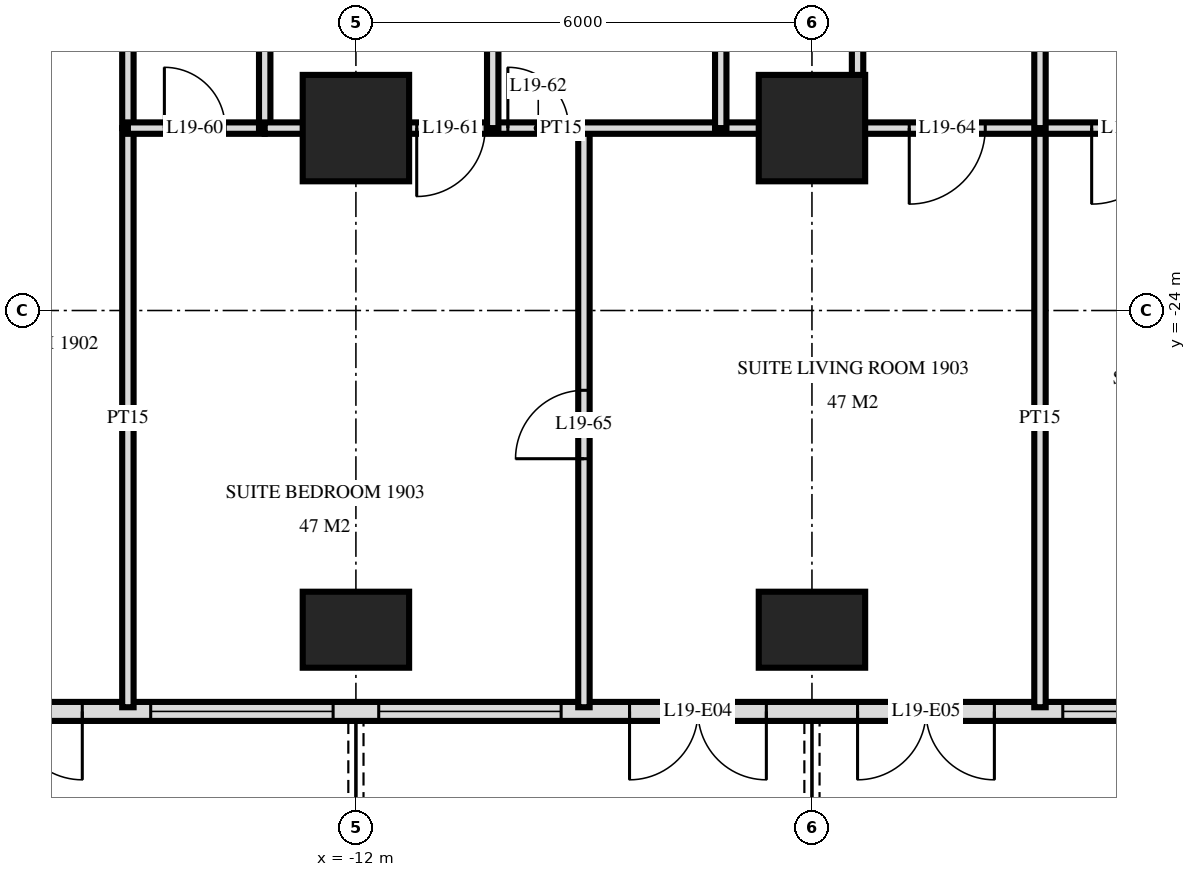
"""IFC4 building model, lengths in metres.
Left out: names, types, materials, properties, quantities, classifications, styles, units other than length and angle.
Written with IfcOpenShell. Run it as: python <this file> out.ifc"""

import sys

from ifc_helpers import new_model, si_unit, direction, frame, frame_2d, origin, origin_2d, place, context, subcontext, project, spatial, rectangle, extrude, element, fill, save


model = new_model("IFC4")
c1 = context("Model", 3, precision=1e-05, world=origin(), true_north=direction((0.0, 1.0)))
c2 = subcontext(c1, "Body", "Model", "MODEL_VIEW")
j1 = project(units=[si_unit("LENGTHUNIT", "METRE"), si_unit("PLANEANGLEUNIT", "RADIAN")], contexts=[c1])
p1 = place(None, origin())
s1 = spatial("IfcSite", under=j1, at=p1, CompositionType="ELEMENT")
p2 = place(p1, origin())
s2 = spatial("IfcBuilding", under=s1, at=p2, CompositionType="ELEMENT")
p3 = place(p2, frame((0.0, 0.0, 78.0)))
s3 = spatial("IfcBuildingStorey", under=s2, at=p3, CompositionType="ELEMENT", Elevation=78.0)
p4 = place(p3, frame((-12.0, -28.2, 0.0), z_axis=(0.0, 0.0, 1.0), x_axis=(1.0, 0.0, 0.0)))
e1 = element("IfcColumn", 1, at=p4, inside=s3, PredefinedType="COLUMN", context=c2, shape_type="SweptSolid", body=[
    extrude(rectangle(XDim=1.4, YDim=1.0, at=origin_2d()), origin(), (0.0, 0.0, 1.0), 3.6),
])
p5 = place(p3, frame((-12.0, -21.6, 0.0), z_axis=(0.0, 0.0, 1.0), x_axis=(1.0, 0.0, 0.0)))
e2 = element("IfcColumn", 2, at=p5, inside=s3, PredefinedType="COLUMN", context=c2, shape_type="SweptSolid", body=[
    extrude(rectangle(XDim=1.4, YDim=1.4, at=origin_2d()), origin(), (0.0, 0.0, 1.0), 3.6),
])
p6 = place(p3, frame((-6.0, -28.2, 0.0), z_axis=(0.0, 0.0, 1.0), x_axis=(1.0, 0.0, 0.0)))
e3 = element("IfcColumn", 3, at=p6, inside=s3, PredefinedType="COLUMN", context=c2, shape_type="SweptSolid", body=[
    extrude(rectangle(XDim=1.4, YDim=1.0, at=origin_2d()), origin(), (0.0, 0.0, 1.0), 3.6),
])
p7 = place(p3, frame((-6.0, -21.6, 0.0), z_axis=(0.0, 0.0, 1.0), x_axis=(1.0, 0.0, 0.0)))
e4 = element("IfcColumn", 4, at=p7, inside=s3, PredefinedType="COLUMN", context=c2, shape_type="SweptSolid", body=[
    extrude(rectangle(XDim=1.4, YDim=1.4, at=origin_2d()), origin(), (0.0, 0.0, 1.0), 3.6),
])
p8 = place(p3, frame((-28.775, -29.275, 0.0), z_axis=(0.0, 0.0, 1.0), x_axis=(1.0, 0.0, 0.0)))
e5 = element("IfcWall", 5, at=p8, inside=s3, PredefinedType="SOLIDWALL", context=c2, shape_type="SweptSolid", body=[
    extrude(rectangle(XDim=57.551, YDim=0.25, at=frame_2d((28.775, 0.0))), origin(), (0.0, 0.0, 1.0), 3.32),
])
p9 = place(p8, frame((0.575, 0.0, 0.0)))
e6 = element("IfcOpeningElement", 6, at=p9, cuts=e5, PredefinedType="OPENING", context=c2, shape_type="SweptSolid", body=[
    extrude(rectangle(XDim=1.8, YDim=2.4, at=frame_2d((0.9, 1.2))), frame((0.0, 0.135, 0.0), z_axis=(0.0, -1.0, 0.0), x_axis=(1.0, 0.0, 0.0)), (0.0, 0.0, 1.0), 0.27),
])
p10 = place(p8, frame((5.375, 0.0, 0.0)))
e7 = element("IfcOpeningElement", 7, at=p10, cuts=e5, PredefinedType="OPENING", context=c2, shape_type="SweptSolid", body=[
    extrude(rectangle(XDim=1.8, YDim=2.4, at=frame_2d((0.9, 1.2))), frame((0.0, 0.135, 0.0), z_axis=(0.0, -1.0, 0.0), x_axis=(1.0, 0.0, 0.0)), (0.0, 0.0, 1.0), 0.27),
])
p11 = place(p8, frame((8.075, 0.0, 0.3)))
e8 = element("IfcOpeningElement", 8, at=p11, cuts=e5, PredefinedType="OPENING", context=c2, shape_type="SweptSolid", body=[
    extrude(rectangle(XDim=2.4, YDim=2.1, at=frame_2d((1.2, 1.05))), frame((0.0, 0.135, 0.0), z_axis=(0.0, -1.0, 0.0), x_axis=(1.0, 0.0, 0.0)), (0.0, 0.0, 1.0), 0.27),
])
p12 = place(p8, frame((11.375, 0.0, 0.0)))
e9 = element("IfcOpeningElement", 9, at=p12, cuts=e5, PredefinedType="OPENING", context=c2, shape_type="SweptSolid", body=[
    extrude(rectangle(XDim=1.8, YDim=2.4, at=frame_2d((0.9, 1.2))), frame((0.0, 0.135, 0.0), z_axis=(0.0, -1.0, 0.0), x_axis=(1.0, 0.0, 0.0)), (0.0, 0.0, 1.0), 0.27),
])
p13 = place(p8, frame((14.075, 0.0, 0.3)))
e10 = element("IfcOpeningElement", 10, at=p13, cuts=e5, PredefinedType="OPENING", context=c2, shape_type="SweptSolid", body=[
    extrude(rectangle(XDim=2.4, YDim=2.1, at=frame_2d((1.2, 1.05))), frame((0.0, 0.135, 0.0), z_axis=(0.0, -1.0, 0.0), x_axis=(1.0, 0.0, 0.0)), (0.0, 0.0, 1.0), 0.27),
])
p14 = place(p8, frame((17.075, 0.0, 0.3)))
e11 = element("IfcOpeningElement", 11, at=p14, cuts=e5, PredefinedType="OPENING", context=c2, shape_type="SweptSolid", body=[
    extrude(rectangle(XDim=2.4, YDim=2.1, at=frame_2d((1.2, 1.05))), frame((0.0, 0.135, 0.0), z_axis=(0.0, -1.0, 0.0), x_axis=(1.0, 0.0, 0.0)), (0.0, 0.0, 1.0), 0.27),
])
p15 = place(p8, frame((20.375, 0.0, 0.0)))
e12 = element("IfcOpeningElement", 12, at=p15, cuts=e5, PredefinedType="OPENING", context=c2, shape_type="SweptSolid", body=[
    extrude(rectangle(XDim=1.8, YDim=2.4, at=frame_2d((0.9, 1.2))), frame((0.0, 0.135, 0.0), z_axis=(0.0, -1.0, 0.0), x_axis=(1.0, 0.0, 0.0)), (0.0, 0.0, 1.0), 0.27),
])
p16 = place(p8, frame((23.375, 0.0, 0.0)))
e13 = element("IfcOpeningElement", 13, at=p16, cuts=e5, PredefinedType="OPENING", context=c2, shape_type="SweptSolid", body=[
    extrude(rectangle(XDim=1.8, YDim=2.4, at=frame_2d((0.9, 1.2))), frame((0.0, 0.135, 0.0), z_axis=(0.0, -1.0, 0.0), x_axis=(1.0, 0.0, 0.0)), (0.0, 0.0, 1.0), 0.27),
])
p17 = place(p8, frame((26.075, 0.0, 0.3)))
e14 = element("IfcOpeningElement", 14, at=p17, cuts=e5, PredefinedType="OPENING", context=c2, shape_type="SweptSolid", body=[
    extrude(rectangle(XDim=2.4, YDim=2.1, at=frame_2d((1.2, 1.05))), frame((0.0, 0.135, 0.0), z_axis=(0.0, -1.0, 0.0), x_axis=(1.0, 0.0, 0.0)), (0.0, 0.0, 1.0), 0.27),
])
p18 = place(p8, frame((29.375, 0.0, 0.0)))
e15 = element("IfcOpeningElement", 15, at=p18, cuts=e5, PredefinedType="OPENING", context=c2, shape_type="SweptSolid", body=[
    extrude(rectangle(XDim=1.8, YDim=2.4, at=frame_2d((0.9, 1.2))), frame((0.0, 0.135, 0.0), z_axis=(0.0, -1.0, 0.0), x_axis=(1.0, 0.0, 0.0)), (0.0, 0.0, 1.0), 0.27),
])
p19 = place(p8, frame((32.075, 0.0, 0.3)))
e16 = element("IfcOpeningElement", 16, at=p19, cuts=e5, PredefinedType="OPENING", context=c2, shape_type="SweptSolid", body=[
    extrude(rectangle(XDim=2.4, YDim=2.1, at=frame_2d((1.2, 1.05))), frame((0.0, 0.135, 0.0), z_axis=(0.0, -1.0, 0.0), x_axis=(1.0, 0.0, 0.0)), (0.0, 0.0, 1.0), 0.27),
])
p20 = place(p8, frame((35.375, 0.0, 0.0)))
e17 = element("IfcOpeningElement", 17, at=p20, cuts=e5, PredefinedType="OPENING", context=c2, shape_type="SweptSolid", body=[
    extrude(rectangle(XDim=1.8, YDim=2.4, at=frame_2d((0.9, 1.2))), frame((0.0, 0.135, 0.0), z_axis=(0.0, -1.0, 0.0), x_axis=(1.0, 0.0, 0.0)), (0.0, 0.0, 1.0), 0.27),
])
p21 = place(p8, frame((38.075, 0.0, 0.3)))
e18 = element("IfcOpeningElement", 18, at=p21, cuts=e5, PredefinedType="OPENING", context=c2, shape_type="SweptSolid", body=[
    extrude(rectangle(XDim=2.4, YDim=2.1, at=frame_2d((1.2, 1.05))), frame((0.0, 0.135, 0.0), z_axis=(0.0, -1.0, 0.0), x_axis=(1.0, 0.0, 0.0)), (0.0, 0.0, 1.0), 0.27),
])
p22 = place(p8, frame((41.375, 0.0, 0.0)))
e19 = element("IfcOpeningElement", 19, at=p22, cuts=e5, PredefinedType="OPENING", context=c2, shape_type="SweptSolid", body=[
    extrude(rectangle(XDim=1.8, YDim=2.4, at=frame_2d((0.9, 1.2))), frame((0.0, 0.135, 0.0), z_axis=(0.0, -1.0, 0.0), x_axis=(1.0, 0.0, 0.0)), (0.0, 0.0, 1.0), 0.27),
])
p23 = place(p8, frame((44.075, 0.0, 0.3)))
e20 = element("IfcOpeningElement", 20, at=p23, cuts=e5, PredefinedType="OPENING", context=c2, shape_type="SweptSolid", body=[
    extrude(rectangle(XDim=2.4, YDim=2.1, at=frame_2d((1.2, 1.05))), frame((0.0, 0.135, 0.0), z_axis=(0.0, -1.0, 0.0), x_axis=(1.0, 0.0, 0.0)), (0.0, 0.0, 1.0), 0.27),
])
p24 = place(p8, frame((47.075, 0.0, 0.3)))
e21 = element("IfcOpeningElement", 21, at=p24, cuts=e5, PredefinedType="OPENING", context=c2, shape_type="SweptSolid", body=[
    extrude(rectangle(XDim=2.4, YDim=2.1, at=frame_2d((1.2, 1.05))), frame((0.0, 0.135, 0.0), z_axis=(0.0, -1.0, 0.0), x_axis=(1.0, 0.0, 0.0)), (0.0, 0.0, 1.0), 0.27),
])
p25 = place(p8, frame((50.375, 0.0, 0.0)))
e22 = element("IfcOpeningElement", 22, at=p25, cuts=e5, PredefinedType="OPENING", context=c2, shape_type="SweptSolid", body=[
    extrude(rectangle(XDim=1.8, YDim=2.4, at=frame_2d((0.9, 1.2))), frame((0.0, 0.135, 0.0), z_axis=(0.0, -1.0, 0.0), x_axis=(1.0, 0.0, 0.0)), (0.0, 0.0, 1.0), 0.27),
])
p26 = place(p8, frame((53.375, 0.0, 0.0)))
e23 = element("IfcOpeningElement", 23, at=p26, cuts=e5, PredefinedType="OPENING", context=c2, shape_type="SweptSolid", body=[
    extrude(rectangle(XDim=1.8, YDim=2.4, at=frame_2d((0.9, 1.2))), frame((0.0, 0.135, 0.0), z_axis=(0.0, -1.0, 0.0), x_axis=(1.0, 0.0, 0.0)), (0.0, 0.0, 1.0), 0.27),
])
p27 = place(p3, frame((-3.0, -21.6, 0.0), z_axis=(0.0, 0.0, 1.0), x_axis=(0.0, 1.0, 0.0)))
e24 = element("IfcWall", 24, at=p27, inside=s3, PredefinedType="PARTITIONING", context=c2, shape_type="SweptSolid", body=[
    extrude(rectangle(XDim=4.2, YDim=0.15, at=frame_2d((2.1, 0.0))), origin(), (0.0, 0.0, 1.0), 3.32),
])
p28 = place(p3, frame((-3.0, -29.22, 0.0), z_axis=(0.0, 0.0, 1.0), x_axis=(0.0, 1.0, 0.0)))
e25 = element("IfcWall", 25, at=p28, inside=s3, PredefinedType="PARTITIONING", context=c2, shape_type="SweptSolid", body=[
    extrude(rectangle(XDim=7.62, YDim=0.15, at=frame_2d((3.81, 0.0))), origin(), (0.0, 0.0, 1.0), 3.32),
])
p29 = place(p3, frame((-5.4, -21.6, 0.0), z_axis=(0.0, 0.0, 1.0), x_axis=(0.0, 1.0, 0.0)))
e26 = element("IfcWall", 26, at=p29, inside=s3, PredefinedType="PARTITIONING", context=c2, shape_type="SweptSolid", body=[
    extrude(rectangle(XDim=4.2, YDim=0.15, at=frame_2d((2.1, 0.0))), origin(), (0.0, 0.0, 1.0), 3.32),
])
p30 = place(p29, frame((1.58, 0.0, 0.0)))
e27 = element("IfcOpeningElement", 27, at=p30, cuts=e26, PredefinedType="OPENING", context=c2, shape_type="SweptSolid", body=[
    extrude(rectangle(XDim=1.0, YDim=2.1, at=frame_2d((0.5, 1.05))), frame((0.0, 0.085, 0.0), z_axis=(0.0, -1.0, 0.0), x_axis=(1.0, 0.0, 0.0)), (0.0, 0.0, 1.0), 0.17),
])
p31 = place(p3, frame((-7.2, -21.6, 0.0), z_axis=(0.0, 0.0, 1.0), x_axis=(0.0, 1.0, 0.0)))
e28 = element("IfcWall", 28, at=p31, inside=s3, PredefinedType="PARTITIONING", context=c2, shape_type="SweptSolid", body=[
    extrude(rectangle(XDim=4.2, YDim=0.15, at=frame_2d((2.1, 0.0))), origin(), (0.0, 0.0, 1.0), 3.32),
])
p32 = place(p3, frame((-9.0, -29.22, 0.0), z_axis=(0.0, 0.0, 1.0), x_axis=(0.0, 1.0, 0.0)))
e29 = element("IfcWall", 29, at=p32, inside=s3, PredefinedType="PARTITIONING", context=c2, shape_type="SweptSolid", body=[
    extrude(rectangle(XDim=7.62, YDim=0.15, at=frame_2d((3.81, 0.0))), origin(), (0.0, 0.0, 1.0), 3.32),
])
p33 = place(p32, frame((3.27, 0.0, 0.0)))
e30 = element("IfcOpeningElement", 30, at=p33, cuts=e29, PredefinedType="OPENING", context=c2, shape_type="SweptSolid", body=[
    extrude(rectangle(XDim=0.9, YDim=2.1, at=frame_2d((0.45, 1.05))), frame((0.0, 0.085, 0.0), z_axis=(0.0, -1.0, 0.0), x_axis=(1.0, 0.0, 0.0)), (0.0, 0.0, 1.0), 0.17),
])
p34 = place(p3, frame((-10.2, -21.6, 0.0), z_axis=(0.0, 0.0, 1.0), x_axis=(0.0, 1.0, 0.0)))
e31 = element("IfcWall", 31, at=p34, inside=s3, PredefinedType="PARTITIONING", context=c2, shape_type="SweptSolid", body=[
    extrude(rectangle(XDim=4.2, YDim=0.15, at=frame_2d((2.1, 0.0))), origin(), (0.0, 0.0, 1.0), 3.32),
])
p35 = place(p3, frame((-13.2, -21.6, 0.0), z_axis=(0.0, 0.0, 1.0), x_axis=(0.0, 1.0, 0.0)))
e32 = element("IfcWall", 32, at=p35, inside=s3, PredefinedType="PLUMBINGWALL", context=c2, shape_type="SweptSolid", body=[
    extrude(rectangle(XDim=4.2, YDim=0.15, at=frame_2d((2.1, 0.0))), origin(), (0.0, 0.0, 1.0), 3.32),
])
p36 = place(p3, frame((-15.0, -29.22, 0.0), z_axis=(0.0, 0.0, 1.0), x_axis=(0.0, 1.0, 0.0)))
e33 = element("IfcWall", 33, at=p36, inside=s3, PredefinedType="PARTITIONING", context=c2, shape_type="SweptSolid", body=[
    extrude(rectangle(XDim=7.62, YDim=0.15, at=frame_2d((3.81, 0.0))), origin(), (0.0, 0.0, 1.0), 3.32),
])
p37 = place(p3, frame((-15.0, -21.6, 0.0), z_axis=(0.0, 0.0, 1.0), x_axis=(0.0, 1.0, 0.0)))
e34 = element("IfcWall", 34, at=p37, inside=s3, PredefinedType="PLUMBINGWALL", context=c2, shape_type="SweptSolid", body=[
    extrude(rectangle(XDim=4.2, YDim=0.15, at=frame_2d((2.1, 0.0))), origin(), (0.0, 0.0, 1.0), 3.32),
])
p38 = place(p3, frame((-5.4, -21.6, 0.0), z_axis=(0.0, 0.0, 1.0), x_axis=(1.0, 0.0, 0.0)))
e35 = element("IfcWall", 35, at=p38, inside=s3, PredefinedType="PARTITIONING", context=c2, shape_type="SweptSolid", body=[
    extrude(rectangle(XDim=4.8, YDim=0.15, at=frame_2d((2.4, 0.0))), origin(), (0.0, 0.0, 1.0), 3.32),
])
p39 = place(p38, frame((0.68, 0.0, 0.0)))
e36 = element("IfcOpeningElement", 36, at=p39, cuts=e35, PredefinedType="OPENING", context=c2, shape_type="SweptSolid", body=[
    extrude(rectangle(XDim=1.0, YDim=2.1, at=frame_2d((0.5, 1.05))), frame((0.0, 0.085, 0.0), z_axis=(0.0, -1.0, 0.0), x_axis=(1.0, 0.0, 0.0)), (0.0, 0.0, 1.0), 0.17),
])
p40 = place(p38, frame((3.08, 0.0, 0.0)))
e37 = element("IfcOpeningElement", 37, at=p40, cuts=e35, PredefinedType="OPENING", context=c2, shape_type="SweptSolid", body=[
    extrude(rectangle(XDim=1.0, YDim=2.1, at=frame_2d((0.5, 1.05))), frame((0.0, 0.085, 0.0), z_axis=(0.0, -1.0, 0.0), x_axis=(1.0, 0.0, 0.0)), (0.0, 0.0, 1.0), 0.17),
])
p41 = place(p3, frame((-13.2, -21.6, 0.0), z_axis=(0.0, 0.0, 1.0), x_axis=(1.0, 0.0, 0.0)))
e38 = element("IfcWall", 38, at=p41, inside=s3, PredefinedType="PARTITIONING", context=c2, shape_type="SweptSolid", body=[
    extrude(rectangle(XDim=7.8, YDim=0.15, at=frame_2d((3.9, 0.0))), origin(), (0.0, 0.0, 1.0), 3.32),
])
p42 = place(p41, frame((2.0, 0.0, 0.0)))
e39 = element("IfcOpeningElement", 39, at=p42, cuts=e38, PredefinedType="OPENING", context=c2, shape_type="SweptSolid", body=[
    extrude(rectangle(XDim=0.9, YDim=2.1, at=frame_2d((0.45, 1.05))), frame((0.0, 0.085, 0.0), z_axis=(0.0, -1.0, 0.0), x_axis=(1.0, 0.0, 0.0)), (0.0, 0.0, 1.0), 0.17),
])
p43 = place(p41, frame((3.199, 0.0, 0.0)))
e40 = element("IfcOpeningElement", 40, at=p43, cuts=e38, PredefinedType="OPENING", context=c2, shape_type="SweptSolid", body=[
    extrude(rectangle(XDim=0.8, YDim=2.1, at=frame_2d((0.4, 1.05))), frame((0.0, 0.085, 0.0), z_axis=(0.0, -1.0, 0.0), x_axis=(1.0, 0.0, 0.0)), (0.0, 0.0, 1.0), 0.17),
])
p44 = place(p3, frame((-15.0, -21.6, 0.0), z_axis=(0.0, 0.0, 1.0), x_axis=(1.0, 0.0, 0.0)))
e41 = element("IfcWall", 41, at=p44, inside=s3, PredefinedType="PLUMBINGWALL", context=c2, shape_type="SweptSolid", body=[
    extrude(rectangle(XDim=1.8, YDim=0.15, at=frame_2d((0.9, 0.0))), origin(), (0.0, 0.0, 1.0), 3.32),
])
p45 = place(p44, frame((0.48, 0.0, 0.0)))
e42 = element("IfcOpeningElement", 42, at=p45, cuts=e41, PredefinedType="OPENING", context=c2, shape_type="SweptSolid", body=[
    extrude(rectangle(XDim=0.8, YDim=2.1, at=frame_2d((0.4, 1.05))), frame((0.0, 0.085, 0.0), z_axis=(0.0, -1.0, 0.0), x_axis=(1.0, 0.0, 0.0)), (0.0, 0.0, 1.0), 0.17),
])
p46 = place(p12, frame((0.9, 0.0, 0.0), z_axis=(0.0, 0.0, 1.0), x_axis=(-1.0, 0.0, 0.0)))
e43 = element("IfcDoor", 43, at=p46, inside=s3, OperationType="DOUBLE_DOOR_SINGLE_SWING", PredefinedType="DOOR", context=c2, shape_type="SweptSolid", body=[
    extrude(rectangle(XDim=1.8, YDim=2.4, at=frame_2d((0.0, 1.2))), frame((0.0, -0.025, 0.0), z_axis=(0.0, 1.0, 0.0), x_axis=(-1.0, 0.0, 0.0)), (0.0, 0.0, 1.0), 0.05),
])
fill(e9, e43)
p47 = place(p13, origin())
e44 = element("IfcWindow", 44, at=p47, inside=s3, PartitioningType="SINGLE_PANEL", PredefinedType="WINDOW", context=c2, shape_type="SweptSolid", body=[
    extrude(rectangle(XDim=2.4, YDim=2.1, at=frame_2d((1.2, 1.05))), frame((0.0, 0.03, 0.0), z_axis=(0.0, -1.0, 0.0), x_axis=(1.0, 0.0, 0.0)), (0.0, 0.0, 1.0), 0.06),
])
fill(e10, e44)
p48 = place(p14, origin())
e45 = element("IfcWindow", 45, at=p48, inside=s3, PartitioningType="SINGLE_PANEL", PredefinedType="WINDOW", context=c2, shape_type="SweptSolid", body=[
    extrude(rectangle(XDim=2.4, YDim=2.1, at=frame_2d((1.2, 1.05))), frame((0.0, 0.03, 0.0), z_axis=(0.0, -1.0, 0.0), x_axis=(1.0, 0.0, 0.0)), (0.0, 0.0, 1.0), 0.06),
])
fill(e11, e45)
p49 = place(p15, frame((0.9, 0.0, 0.0), z_axis=(0.0, 0.0, 1.0), x_axis=(-1.0, 0.0, 0.0)))
e46 = element("IfcDoor", 46, at=p49, inside=s3, OperationType="DOUBLE_DOOR_SINGLE_SWING", PredefinedType="DOOR", context=c2, shape_type="SweptSolid", body=[
    extrude(rectangle(XDim=1.8, YDim=2.4, at=frame_2d((0.0, 1.2))), frame((0.0, -0.025, 0.0), z_axis=(0.0, 1.0, 0.0), x_axis=(-1.0, 0.0, 0.0)), (0.0, 0.0, 1.0), 0.05),
])
fill(e12, e46)
p50 = place(p16, frame((0.9, 0.0, 0.0), z_axis=(0.0, 0.0, 1.0), x_axis=(-1.0, 0.0, 0.0)))
e47 = element("IfcDoor", 47, at=p50, inside=s3, OperationType="DOUBLE_DOOR_SINGLE_SWING", PredefinedType="DOOR", context=c2, shape_type="SweptSolid", body=[
    extrude(rectangle(XDim=1.8, YDim=2.4, at=frame_2d((0.0, 1.2))), frame((0.0, -0.025, 0.0), z_axis=(0.0, 1.0, 0.0), x_axis=(-1.0, 0.0, 0.0)), (0.0, 0.0, 1.0), 0.05),
])
fill(e13, e47)
p51 = place(p17, origin())
e48 = element("IfcWindow", 48, at=p51, inside=s3, PartitioningType="SINGLE_PANEL", PredefinedType="WINDOW", context=c2, shape_type="SweptSolid", body=[
    extrude(rectangle(XDim=2.4, YDim=2.1, at=frame_2d((1.2, 1.05))), frame((0.0, 0.03, 0.0), z_axis=(0.0, -1.0, 0.0), x_axis=(1.0, 0.0, 0.0)), (0.0, 0.0, 1.0), 0.06),
])
fill(e14, e48)
p52 = place(p45, origin())
e49 = element("IfcDoor", 49, at=p52, inside=s3, OperationType="SINGLE_SWING_RIGHT", PredefinedType="DOOR", context=c2, shape_type="SweptSolid", body=[
    extrude(rectangle(XDim=0.8, YDim=2.1, at=frame_2d((0.4, 1.05))), frame((0.0, 0.025, 0.0), z_axis=(0.0, -1.0, 0.0), x_axis=(1.0, 0.0, 0.0)), (0.0, 0.0, 1.0), 0.05),
])
fill(e42, e49)
p53 = place(p42, frame((0.45, 0.0, 0.0), z_axis=(0.0, 0.0, 1.0), x_axis=(-1.0, 0.0, 0.0)))
e50 = element("IfcDoor", 50, at=p53, inside=s3, OperationType="SINGLE_SWING_LEFT", PredefinedType="DOOR", context=c2, shape_type="SweptSolid", body=[
    extrude(rectangle(XDim=0.9, YDim=2.1, at=frame_2d((0.0, 1.05))), frame((0.0, -0.025, 0.0), z_axis=(0.0, 1.0, 0.0), x_axis=(-1.0, 0.0, 0.0)), (0.0, 0.0, 1.0), 0.05),
])
fill(e39, e50)
p54 = place(p43, origin())
e51 = element("IfcDoor", 51, at=p54, inside=s3, OperationType="SINGLE_SWING_RIGHT", PredefinedType="DOOR", context=c2, shape_type="SweptSolid", body=[
    extrude(rectangle(XDim=0.8, YDim=2.1, at=frame_2d((0.4, 1.05))), frame((0.0, 0.025, 0.0), z_axis=(0.0, -1.0, 0.0), x_axis=(1.0, 0.0, 0.0)), (0.0, 0.0, 1.0), 0.05),
])
fill(e40, e51)
p55 = place(p39, frame((0.5, 0.0, 0.0), z_axis=(0.0, 0.0, 1.0), x_axis=(-1.0, 0.0, 0.0)))
e52 = element("IfcDoor", 52, at=p55, inside=s3, OperationType="SINGLE_SWING_LEFT", PredefinedType="DOOR", context=c2, shape_type="SweptSolid", body=[
    extrude(rectangle(XDim=1.0, YDim=2.1, at=frame_2d((0.0, 1.05))), frame((0.0, -0.025, 0.0), z_axis=(0.0, 1.0, 0.0), x_axis=(-1.0, 0.0, 0.0)), (0.0, 0.0, 1.0), 0.05),
])
fill(e36, e52)
p56 = place(p33, origin())
e53 = element("IfcDoor", 53, at=p56, inside=s3, OperationType="SINGLE_SWING_RIGHT", PredefinedType="DOOR", context=c2, shape_type="SweptSolid", body=[
    extrude(rectangle(XDim=0.9, YDim=2.1, at=frame_2d((0.45, 1.05))), frame((0.0, 0.025, 0.0), z_axis=(0.0, -1.0, 0.0), x_axis=(1.0, 0.0, 0.0)), (0.0, 0.0, 1.0), 0.05),
])
fill(e30, e53)
p57 = place(p40, frame((0.5, 0.0, 0.0), z_axis=(0.0, 0.0, 1.0), x_axis=(-1.0, 0.0, 0.0)))
e54 = element("IfcDoor", 54, at=p57, inside=s3, OperationType="SINGLE_SWING_LEFT", PredefinedType="DOOR", context=c2, shape_type="SweptSolid", body=[
    extrude(rectangle(XDim=1.0, YDim=2.1, at=frame_2d((0.0, 1.05))), frame((0.0, -0.025, 0.0), z_axis=(0.0, 1.0, 0.0), x_axis=(-1.0, 0.0, 0.0)), (0.0, 0.0, 1.0), 0.05),
])
fill(e37, e54)
save(model, sys.argv[1])
